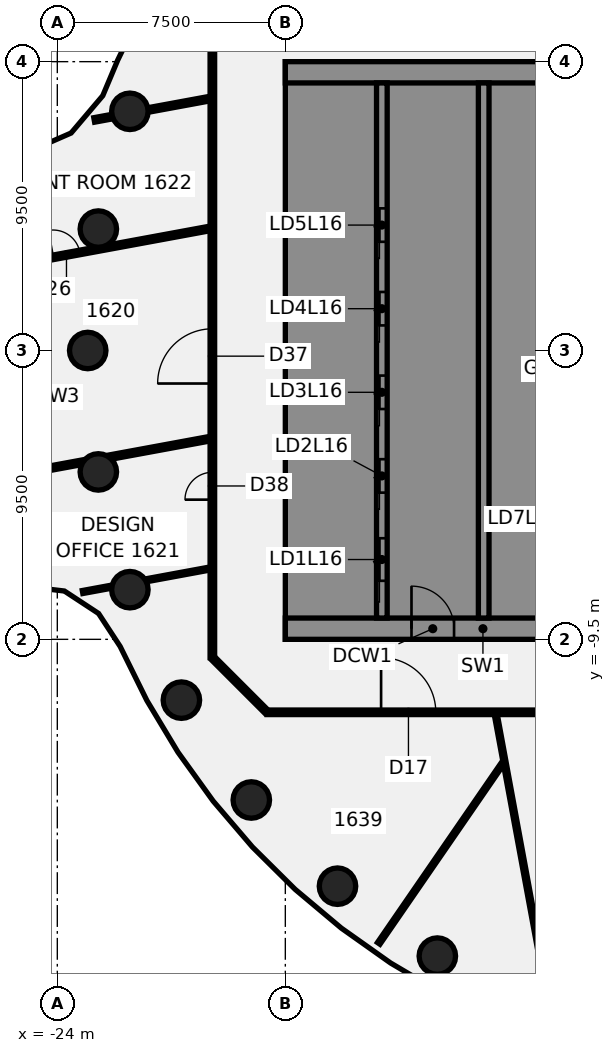
"""IFC4 building model, lengths in metres.
Left out: names, types, materials, properties, quantities, classifications, styles, units other than length and angle.
Written with IfcOpenShell. Run it as: python <this file> out.ifc"""

import sys

from ifc_helpers import new_model, si_unit, direction, frame, frame_2d, origin, origin_2d, place, context, subcontext, project, spatial, polyline, rectangle, circle, outline, extrude, element, fill, save


model = new_model("IFC4")
c1 = context("Model", 3, precision=1e-05, world=origin(), true_north=direction((0.0, 1.0)))
c2 = subcontext(c1, "Body", "Model", "MODEL_VIEW")
j1 = project(units=[si_unit("LENGTHUNIT", "METRE"), si_unit("PLANEANGLEUNIT", "RADIAN")], contexts=[c1])
p1 = place(None, origin())
s1 = spatial("IfcSite", under=j1, at=p1, CompositionType="ELEMENT")
p2 = place(p1, origin())
s2 = spatial("IfcBuilding", under=s1, at=p2, CompositionType="ELEMENT")
p3 = place(p2, frame((0.0, 0.0, 71.5)))
s3 = spatial("IfcBuildingStorey", under=s2, at=p3, CompositionType="ELEMENT", Elevation=71.5)
for number, where, z_axis, x_axis in (
    (1, (-21.613, 7.866, -0.14), (0.0, 0.0, 1.0), (1.0, 0.0, 0.0)),
    (2, (-22.651, 3.994, -0.14), (0.0, 0.0, 1.0), (1.0, 0.0, 0.0)),
    (3, (-23.0, 0.0, -0.14), (0.0, 0.0, 1.0), (1.0, 0.0, 0.0)),
    (4, (-22.651, -3.994, -0.14), (0.0, 0.0, 1.0), (1.0, 0.0, 0.0)),
    (5, (-21.613, -7.866, -0.14), (0.0, 0.0, 1.0), (1.0, 0.0, 0.0)),
    (6, (-19.919, -11.5, -0.14), (0.0, 0.0, 1.0), (1.0, 0.0, 0.0)),
    (7, (-17.619, -14.784, -0.14), (0.0, 0.0, 1.0), (1.0, 0.0, 0.0)),
    (8, (-14.784, -17.619, -0.14), (0.0, 0.0, 1.0), (1.0, 0.0, 0.0)),
    (9, (-11.5, -19.919, -0.14), (0.0, 0.0, 1.0), (1.0, 0.0, 0.0)),
):
    element("IfcColumn", number, at=place(p3, frame(where, z_axis=z_axis, x_axis=x_axis)), inside=s3, PredefinedType="COLUMN", context=c2, shape_type="SweptSolid", body=[
        extrude(circle(Radius=0.6, at=origin_2d()), origin(), (0.0, 0.0, 1.0), 3.75),
    ])
p4 = place(p3, frame((-9.578, -11.969, 0.0), z_axis=(0.0, 0.0, 1.0), x_axis=(0.181440071674, -0.983402003451, 0.0)))
e10 = element("IfcWall", 10, at=p4, inside=s3, PredefinedType="PARTITIONING", context=c2, shape_type="SweptSolid", body=[
    extrude(rectangle(XDim=9.198, YDim=0.1, at=frame_2d((4.599, 0.0))), origin(), (0.0, 0.0, 1.0), 3.01),
])
p5 = place(p3, frame((-18.872, -10.128, 0.0), z_axis=(0.0, 0.0, 1.0), x_axis=(0.707106781187, -0.707106781187, 0.0)))
e11 = element("IfcWall", 11, at=p5, inside=s3, PredefinedType="PARTITIONING", context=c2, shape_type="SweptSolid", body=[
    extrude(rectangle(XDim=2.465, YDim=0.15, at=frame_2d((1.232, 0.0))), origin(), (0.0, 0.0, 1.0), 3.01),
])
p6 = place(p3, frame((-17.1, -11.9, 0.0), z_axis=(0.0, 0.0, 1.0), x_axis=(1.0, 0.0, 0.0)))
e12 = element("IfcWall", 12, at=p6, inside=s3, PredefinedType="PARTITIONING", context=c2, shape_type="SweptSolid", body=[
    extrude(rectangle(XDim=34.165, YDim=0.15, at=frame_2d((17.083, 0.0))), origin(), (0.0, 0.0, 1.0), 3.01),
])
p7 = place(p6, frame((14.33, 0.0, 0.0)))
e13 = element("IfcOpeningElement", 13, at=p7, cuts=e12, PredefinedType="OPENING", context=c2, shape_type="SweptSolid", body=[
    extrude(rectangle(XDim=1.8, YDim=2.1, at=frame_2d((0.9, 1.05))), frame((0.0, 0.085, 0.0), z_axis=(0.0, -1.0, 0.0), x_axis=(1.0, 0.0, 0.0)), (0.0, 0.0, 1.0), 0.17),
])
p8 = place(p6, frame((3.75, 0.0, 0.0)))
e14 = element("IfcOpeningElement", 14, at=p8, cuts=e12, PredefinedType="OPENING", context=c2, shape_type="SweptSolid", body=[
    extrude(rectangle(XDim=1.8, YDim=2.1, at=frame_2d((0.9, 1.05))), frame((0.0, 0.085, 0.0), z_axis=(0.0, -1.0, 0.0), x_axis=(1.0, 0.0, 0.0)), (0.0, 0.0, 1.0), 0.17),
])
p9 = place(p6, frame((27.616, 0.0, 0.0)))
e15 = element("IfcOpeningElement", 15, at=p9, cuts=e12, PredefinedType="OPENING", context=c2, shape_type="SweptSolid", body=[
    extrude(rectangle(XDim=1.8, YDim=2.1, at=frame_2d((0.9, 1.05))), frame((0.0, 0.085, 0.0), z_axis=(0.0, -1.0, 0.0), x_axis=(1.0, 0.0, 0.0)), (0.0, 0.0, 1.0), 0.17),
])
p10 = place(p3, frame((-26.251, 2.674, 0.0), z_axis=(0.0, 0.0, 1.0), x_axis=(0.983432312811, 0.181275718505, 0.0)))
e16 = element("IfcWall", 16, at=p10, inside=s3, PredefinedType="PARTITIONING", context=c2, shape_type="SweptSolid", body=[
    extrude(rectangle(XDim=7.405, YDim=0.15, at=frame_2d((3.702, 0.0))), origin(), (0.0, 0.0, 1.0), 3.01),
])
p11 = place(p10, frame((2.145, 0.0, 0.0)))
e17 = element("IfcOpeningElement", 17, at=p11, cuts=e16, PredefinedType="OPENING", context=c2, shape_type="SweptSolid", body=[
    extrude(rectangle(XDim=0.9, YDim=2.1, at=frame_2d((0.45, 1.05))), frame((0.0, 0.085, 0.0), z_axis=(0.0, -1.0, 0.0), x_axis=(1.0, 0.0, 0.0)), (0.0, 0.0, 1.0), 0.17),
])
p12 = place(p3, frame((-25.022, -4.015, 0.0), z_axis=(0.0, 0.0, 1.0), x_axis=(0.983414430194, 0.181372706015, 0.0)))
e18 = element("IfcWall", 18, at=p12, inside=s3, PredefinedType="PARTITIONING", context=c2, shape_type="SweptSolid", body=[
    extrude(rectangle(XDim=1.891, YDim=0.15, at=frame_2d((0.946, 0.0))), origin(), (0.0, 0.0, 1.0), 3.01),
])
p13 = place(p3, frame((-22.299, -3.513, 0.0), z_axis=(0.0, 0.0, 1.0), x_axis=(0.983420380574, 0.181340439705, 0.0)))
e19 = element("IfcWall", 19, at=p13, inside=s3, PredefinedType="PARTITIONING", context=c2, shape_type="SweptSolid", body=[
    extrude(rectangle(XDim=3.386, YDim=0.15, at=frame_2d((1.693, 0.0))), origin(), (0.0, 0.0, 1.0), 3.01),
])
p14 = place(p3, frame((-23.169, -7.944, 0.0), z_axis=(0.0, 0.0, 1.0), x_axis=(0.983393015188, 0.181488781138, 0.0)))
e20 = element("IfcWall", 20, at=p14, inside=s3, PredefinedType="PARTITIONING", context=c2, shape_type="SweptSolid", body=[
    extrude(rectangle(XDim=0.99, YDim=0.1, at=frame_2d((0.495, 0.0))), origin(), (0.0, 0.0, 1.0), 3.01),
])
p15 = place(p3, frame((-21.087, -7.56, 0.0), z_axis=(0.0, 0.0, 1.0), x_axis=(0.983393076066, 0.181488451272, 0.0)))
e21 = element("IfcWall", 21, at=p15, inside=s3, PredefinedType="PARTITIONING", context=c2, shape_type="SweptSolid", body=[
    extrude(rectangle(XDim=2.154, YDim=0.1, at=frame_2d((1.077, 0.0))), origin(), (0.0, 0.0, 1.0), 3.01),
])
p16 = place(p3, frame((-22.787, 7.583, 0.0), z_axis=(0.0, 0.0, 1.0), x_axis=(0.983438406802, 0.1812426551, 0.0)))
e22 = element("IfcWall", 22, at=p16, inside=s3, PredefinedType="PARTITIONING", context=c2, shape_type="SweptSolid", body=[
    extrude(rectangle(XDim=0.62, YDim=0.15, at=frame_2d((0.31, 0.0))), origin(), (0.0, 0.0, 1.0), 3.01),
])
p17 = place(p3, frame((-21.015, 7.91, 0.0), z_axis=(0.0, 0.0, 1.0), x_axis=(0.983404735205, 0.181425264991, 0.0)))
e23 = element("IfcWall", 23, at=p17, inside=s3, PredefinedType="PARTITIONING", context=c2, shape_type="SweptSolid", body=[
    extrude(rectangle(XDim=2.08, YDim=0.15, at=frame_2d((1.04, 0.0))), origin(), (0.0, 0.0, 1.0), 3.01),
])
p18 = place(p3, frame((-13.428, -19.5, 0.0), z_axis=(0.0, 0.0, 1.0), x_axis=(0.5671270475, 0.823630324839, 0.0)))
e24 = element("IfcWall", 24, at=p18, inside=s3, PredefinedType="PARTITIONING", context=c2, shape_type="SweptSolid", body=[
    extrude(rectangle(XDim=7.186, YDim=0.1, at=frame_2d((3.593, 0.0))), origin(), (0.0, 0.0, 1.0), 3.01),
])
p19 = place(p3, frame((-18.9, -10.1, 0.0), z_axis=(0.0, 0.0, 1.0), x_axis=(0.0, 1.0, 0.0)))
e25 = element("IfcWall", 25, at=p19, inside=s3, PredefinedType="PARTITIONING", context=c2, shape_type="SweptSolid", body=[
    extrude(rectangle(XDim=20.2, YDim=0.15, at=frame_2d((10.1, 0.0))), origin(), (0.0, 0.0, 1.0), 3.01),
])
p20 = place(p19, frame((9.014, 0.0, 0.0)))
e26 = element("IfcOpeningElement", 26, at=p20, cuts=e25, PredefinedType="OPENING", context=c2, shape_type="SweptSolid", body=[
    extrude(rectangle(XDim=1.8, YDim=2.1, at=frame_2d((0.9, 1.05))), frame((0.0, 0.085, 0.0), z_axis=(0.0, -1.0, 0.0), x_axis=(1.0, 0.0, 0.0)), (0.0, 0.0, 1.0), 0.17),
])
p21 = place(p19, frame((5.194, 0.0, 0.0)))
e27 = element("IfcOpeningElement", 27, at=p21, cuts=e25, PredefinedType="OPENING", context=c2, shape_type="SweptSolid", body=[
    extrude(rectangle(XDim=0.9, YDim=2.1, at=frame_2d((0.45, 1.05))), frame((0.0, 0.085, 0.0), z_axis=(0.0, -1.0, 0.0), x_axis=(1.0, 0.0, 0.0)), (0.0, 0.0, 1.0), 0.17),
])
p22 = place(p3, frame((-16.5, -9.15, 0.0), z_axis=(0.0, 0.0, 1.0), x_axis=(1.0, 0.0, 0.0)))
e28 = element("IfcWall", 28, at=p22, inside=s3, PredefinedType="SHEAR", context=c2, shape_type="SweptSolid", body=[
    extrude(rectangle(XDim=13.0, YDim=0.7, at=frame_2d((6.5, 0.0))), origin(), (0.0, 0.0, 1.0), 3.61),
])
p23 = place(p22, frame((4.15, 0.0, 0.0)))
e29 = element("IfcOpeningElement", 29, at=p23, cuts=e28, PredefinedType="OPENING", context=c2, shape_type="SweptSolid", body=[
    extrude(rectangle(XDim=1.4, YDim=2.1, at=frame_2d((0.7, 1.05))), frame((0.0, 0.36, 0.0), z_axis=(0.0, -1.0, 0.0), x_axis=(1.0, 0.0, 0.0)), (0.0, 0.0, 1.0), 0.72),
])
p24 = place(p22, frame((10.125, 0.0, 0.0)))
e30 = element("IfcOpeningElement", 30, at=p24, cuts=e28, PredefinedType="OPENING", context=c2, shape_type="SweptSolid", body=[
    extrude(rectangle(XDim=1.4, YDim=2.1, at=frame_2d((0.7, 1.05))), frame((0.0, 0.36, 0.0), z_axis=(0.0, -1.0, 0.0), x_axis=(1.0, 0.0, 0.0)), (0.0, 0.0, 1.0), 0.72),
])
p25 = place(p3, origin())
e31 = element("IfcWall", 31, at=p25, inside=s3, PredefinedType="SHEAR", context=c2, shape_type="SweptSolid", body=[
    extrude(outline(polyline([(-13.5, -8.8), (-13.5, -8.125), (-15.8, -8.125), (-15.8, -5.625), (-13.5, -5.625), (-13.5, -5.375), (-15.8, -5.375), (-15.8, -2.875), (-13.5, -2.875), (-13.5, -2.625), (-15.8, -2.625), (-15.8, -0.125), (-13.5, -0.125), (-13.5, 0.125), (-15.8, 0.125), (-15.8, 2.625), (-13.5, 2.625), (-13.5, 2.875), (-15.8, 2.875), (-15.8, 5.375), (-13.5, 5.375), (-13.5, 5.625), (-15.8, 5.625), (-15.8, 8.125), (-13.5, 8.125), (-13.5, 8.8), (-15.8, 8.8), (-16.5, 8.8), (-16.5, -8.8), (-15.8, -8.8), (-13.5, -8.8)])), origin(), (0.0, 0.0, 1.0), 3.61),
])
p26 = place(p3, frame((-16.5, 9.15, 0.0), z_axis=(0.0, 0.0, 1.0), x_axis=(1.0, 0.0, 0.0)))
e32 = element("IfcWall", 32, at=p26, inside=s3, PredefinedType="SHEAR", context=c2, shape_type="SweptSolid", body=[
    extrude(rectangle(XDim=13.0, YDim=0.7, at=frame_2d((6.5, 0.0))), origin(), (0.0, 0.0, 1.0), 3.61),
])
p27 = place(p3, origin())
e33 = element("IfcWall", 33, at=p27, inside=s3, PredefinedType="SHEAR", context=c2, shape_type="SweptSolid", body=[
    extrude(outline(polyline([(-9.8, -5.375), (-9.8, -5.625), (-7.5, -5.625), (-7.15, -5.625), (-7.15, 8.8), (-7.5, 8.8), (-9.8, 8.8), (-9.8, 8.125), (-7.5, 8.125), (-7.5, 5.625), (-9.8, 5.625), (-9.8, 5.375), (-7.5, 5.375), (-7.5, 2.875), (-9.8, 2.875), (-9.8, 2.625), (-7.5, 2.625), (-7.5, 0.125), (-9.8, 0.125), (-9.8, -0.125), (-7.5, -0.125), (-7.5, -2.625), (-9.8, -2.625), (-9.8, -2.875), (-7.5, -2.875), (-7.5, -5.375), (-9.8, -5.375)])), origin(), (0.0, 0.0, 1.0), 3.61),
])
p28 = place(p3, origin())
e34 = element("IfcWall", 34, at=p28, inside=s3, PredefinedType="SHEAR", context=c2, shape_type="SweptSolid", body=[
    extrude(outline(polyline([(-7.5, -8.125), (-9.55, -8.125), (-9.55, -5.625), (-9.8, -5.625), (-9.8, -8.125), (-9.8, -8.8), (-7.5, -8.8), (-7.5, -8.125)])), origin(), (0.0, 0.0, 1.0), 3.61),
])
p29 = place(p3, frame((-13.325, -8.8, 0.0), z_axis=(0.0, 0.0, 1.0), x_axis=(0.0, 1.0, 0.0)))
e35 = element("IfcWall", 35, at=p29, inside=s3, PredefinedType="SHEAR", context=c2, shape_type="SweptSolid", body=[
    extrude(rectangle(XDim=17.6, YDim=0.35, at=frame_2d((8.8, 0.0))), origin(), (0.0, 0.0, 1.0), 3.61),
])
p30 = place(p29, frame((1.225, 0.0, 0.0)))
e36 = element("IfcOpeningElement", 36, at=p30, cuts=e35, PredefinedType="OPENING", context=c2, shape_type="SweptSolid", body=[
    extrude(rectangle(XDim=1.4, YDim=2.1, at=frame_2d((0.7, 1.05))), frame((0.0, 0.185, 0.0), z_axis=(0.0, -1.0, 0.0), x_axis=(1.0, 0.0, 0.0)), (0.0, 0.0, 1.0), 0.37),
])
p31 = place(p29, frame((4.125, 0.0, 0.0)))
e37 = element("IfcOpeningElement", 37, at=p31, cuts=e35, PredefinedType="OPENING", context=c2, shape_type="SweptSolid", body=[
    extrude(rectangle(XDim=1.1, YDim=2.1, at=frame_2d((0.55, 1.05))), frame((0.0, 0.185, 0.0), z_axis=(0.0, -1.0, 0.0), x_axis=(1.0, 0.0, 0.0)), (0.0, 0.0, 1.0), 0.37),
])
p32 = place(p29, frame((6.875, 0.0, 0.0)))
e38 = element("IfcOpeningElement", 38, at=p32, cuts=e35, PredefinedType="OPENING", context=c2, shape_type="SweptSolid", body=[
    extrude(rectangle(XDim=1.1, YDim=2.1, at=frame_2d((0.55, 1.05))), frame((0.0, 0.185, 0.0), z_axis=(0.0, -1.0, 0.0), x_axis=(1.0, 0.0, 0.0)), (0.0, 0.0, 1.0), 0.37),
])
p33 = place(p29, frame((9.625, 0.0, 0.0)))
e39 = element("IfcOpeningElement", 39, at=p33, cuts=e35, PredefinedType="OPENING", context=c2, shape_type="SweptSolid", body=[
    extrude(rectangle(XDim=1.1, YDim=2.1, at=frame_2d((0.55, 1.05))), frame((0.0, 0.185, 0.0), z_axis=(0.0, -1.0, 0.0), x_axis=(1.0, 0.0, 0.0)), (0.0, 0.0, 1.0), 0.37),
])
p34 = place(p29, frame((12.375, 0.0, 0.0)))
e40 = element("IfcOpeningElement", 40, at=p34, cuts=e35, PredefinedType="OPENING", context=c2, shape_type="SweptSolid", body=[
    extrude(rectangle(XDim=1.1, YDim=2.1, at=frame_2d((0.55, 1.05))), frame((0.0, 0.185, 0.0), z_axis=(0.0, -1.0, 0.0), x_axis=(1.0, 0.0, 0.0)), (0.0, 0.0, 1.0), 0.37),
])
p35 = place(p3, frame((-9.975, -8.8, 0.0), z_axis=(0.0, 0.0, 1.0), x_axis=(0.0, 1.0, 0.0)))
e41 = element("IfcWall", 41, at=p35, inside=s3, PredefinedType="SHEAR", context=c2, shape_type="SweptSolid", body=[
    extrude(rectangle(XDim=17.6, YDim=0.35, at=frame_2d((8.8, 0.0))), origin(), (0.0, 0.0, 1.0), 3.61),
])
p36 = place(p8, frame((1.8, 0.0, 0.0), z_axis=(0.0, 0.0, 1.0), x_axis=(-1.0, 0.0, 0.0)))
e42 = element("IfcDoor", 42, at=p36, inside=s3, OperationType="DOUBLE_DOOR_SINGLE_SWING", PredefinedType="DOOR", context=c2, shape_type="SweptSolid", body=[
    extrude(rectangle(XDim=1.8, YDim=2.1, at=frame_2d((0.9, 1.05))), frame((0.0, 0.025, 0.0), z_axis=(0.0, -1.0, 0.0), x_axis=(1.0, 0.0, 0.0)), (0.0, 0.0, 1.0), 0.05),
])
fill(e14, e42)
p37 = place(p11, origin())
e43 = element("IfcDoor", 43, at=p37, inside=s3, OperationType="SINGLE_SWING_RIGHT", PredefinedType="DOOR", context=c2, shape_type="SweptSolid", body=[
    extrude(rectangle(XDim=0.9, YDim=2.1, at=frame_2d((0.45, 1.05))), frame((0.0, 0.025, 0.0), z_axis=(0.0, -1.0, 0.0), x_axis=(1.0, 0.0, 0.0)), (0.0, 0.0, 1.0), 0.05),
])
fill(e17, e43)
p38 = place(p20, frame((1.8, 0.0, 0.0), z_axis=(0.0, 0.0, 1.0), x_axis=(-1.0, 0.0, 0.0)))
e44 = element("IfcDoor", 44, at=p38, inside=s3, OperationType="DOUBLE_DOOR_SINGLE_SWING", PredefinedType="DOOR", context=c2, shape_type="SweptSolid", body=[
    extrude(rectangle(XDim=1.8, YDim=2.1, at=frame_2d((0.9, 1.05))), frame((0.0, 0.025, 0.0), z_axis=(0.0, -1.0, 0.0), x_axis=(1.0, 0.0, 0.0)), (0.0, 0.0, 1.0), 0.05),
])
fill(e26, e44)
p39 = place(p21, origin())
e45 = element("IfcDoor", 45, at=p39, inside=s3, OperationType="SINGLE_SWING_RIGHT", PredefinedType="DOOR", context=c2, shape_type="SweptSolid", body=[
    extrude(rectangle(XDim=0.9, YDim=2.1, at=frame_2d((0.45, 1.05))), frame((0.0, 0.025, 0.0), z_axis=(0.0, -1.0, 0.0), x_axis=(1.0, 0.0, 0.0)), (0.0, 0.0, 1.0), 0.05),
])
fill(e27, e45)
p40 = place(p23, origin())
e46 = element("IfcDoor", 46, at=p40, inside=s3, OperationType="SINGLE_SWING_LEFT", PredefinedType="DOOR", context=c2, shape_type="SweptSolid", body=[
    extrude(rectangle(XDim=1.4, YDim=2.1, at=frame_2d((0.7, 1.05))), frame((0.0, 0.025, 0.0), z_axis=(0.0, -1.0, 0.0), x_axis=(1.0, 0.0, 0.0)), (0.0, 0.0, 1.0), 0.05),
])
fill(e29, e46)
p41 = place(p30, origin())
e47 = element("IfcDoor", 47, at=p41, inside=s3, OperationType="SLIDING_TO_LEFT", PredefinedType="DOOR", context=c2, shape_type="SweptSolid", body=[
    extrude(rectangle(XDim=1.4, YDim=2.1, at=frame_2d((0.7, 1.05))), frame((0.0, 0.025, 0.0), z_axis=(0.0, -1.0, 0.0), x_axis=(1.0, 0.0, 0.0)), (0.0, 0.0, 1.0), 0.05),
])
fill(e36, e47)
p42 = place(p31, origin())
e48 = element("IfcDoor", 48, at=p42, inside=s3, OperationType="SLIDING_TO_LEFT", PredefinedType="DOOR", context=c2, shape_type="SweptSolid", body=[
    extrude(rectangle(XDim=1.1, YDim=2.1, at=frame_2d((0.55, 1.05))), frame((0.0, 0.025, 0.0), z_axis=(0.0, -1.0, 0.0), x_axis=(1.0, 0.0, 0.0)), (0.0, 0.0, 1.0), 0.05),
])
fill(e37, e48)
p43 = place(p32, origin())
e49 = element("IfcDoor", 49, at=p43, inside=s3, OperationType="SLIDING_TO_LEFT", PredefinedType="DOOR", context=c2, shape_type="SweptSolid", body=[
    extrude(rectangle(XDim=1.1, YDim=2.1, at=frame_2d((0.55, 1.05))), frame((0.0, 0.025, 0.0), z_axis=(0.0, -1.0, 0.0), x_axis=(1.0, 0.0, 0.0)), (0.0, 0.0, 1.0), 0.05),
])
fill(e38, e49)
p44 = place(p33, origin())
e50 = element("IfcDoor", 50, at=p44, inside=s3, OperationType="SLIDING_TO_LEFT", PredefinedType="DOOR", context=c2, shape_type="SweptSolid", body=[
    extrude(rectangle(XDim=1.1, YDim=2.1, at=frame_2d((0.55, 1.05))), frame((0.0, 0.025, 0.0), z_axis=(0.0, -1.0, 0.0), x_axis=(1.0, 0.0, 0.0)), (0.0, 0.0, 1.0), 0.05),
])
fill(e39, e50)
p45 = place(p34, origin())
e51 = element("IfcDoor", 51, at=p45, inside=s3, OperationType="SLIDING_TO_LEFT", PredefinedType="DOOR", context=c2, shape_type="SweptSolid", body=[
    extrude(rectangle(XDim=1.1, YDim=2.1, at=frame_2d((0.55, 1.05))), frame((0.0, 0.025, 0.0), z_axis=(0.0, -1.0, 0.0), x_axis=(1.0, 0.0, 0.0)), (0.0, 0.0, 1.0), 0.05),
])
fill(e40, e51)
save(model, sys.argv[1])
